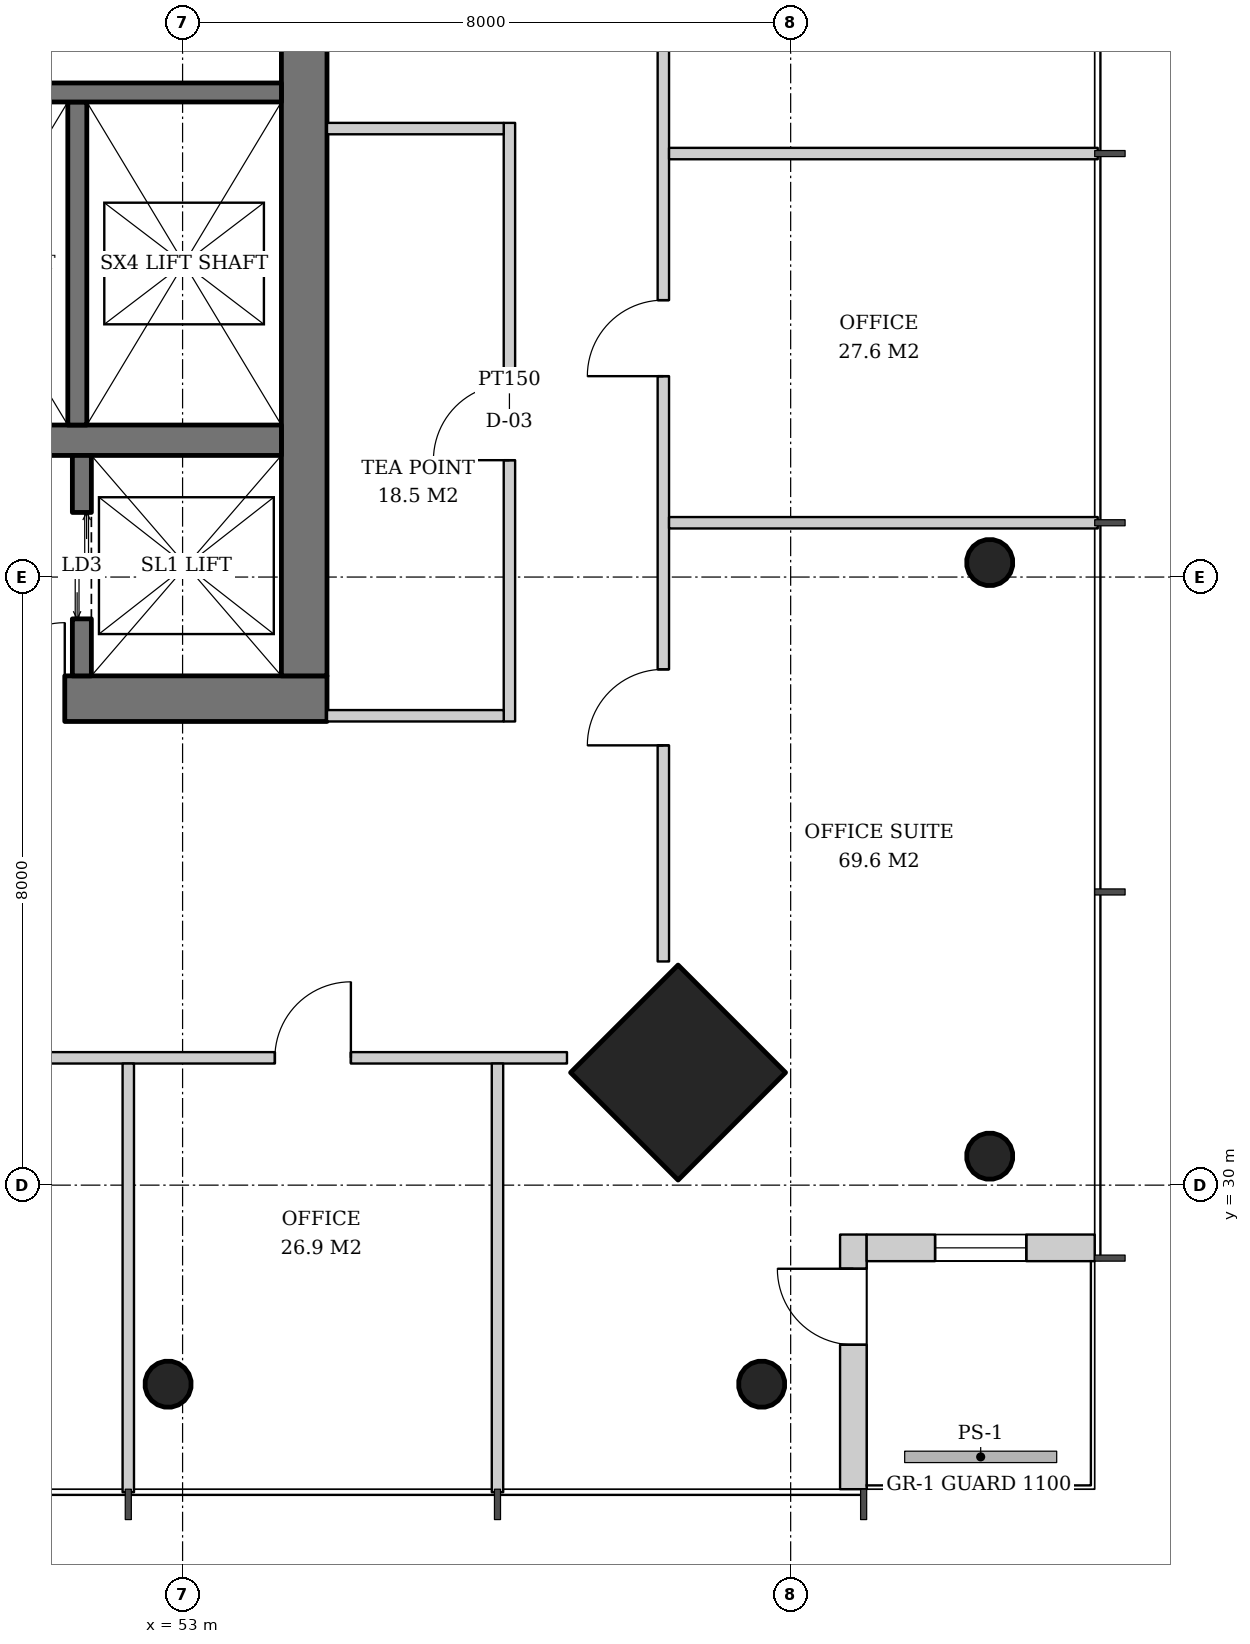
"""IFC4 building model, lengths in metres.
Left out: names, types, materials, properties, quantities, classifications, styles, units other than length and angle.
Written with IfcOpenShell. Run it as: python <this file> out.ifc"""

import sys

from ifc_helpers import new_model, si_unit, direction, frame, frame_2d, origin, origin_2d, place, context, subcontext, project, spatial, rectangle, hollow_circle, extrude, element, fill, save


model = new_model("IFC4")
c1 = context("Model", 3, precision=1e-05, world=origin(), true_north=direction((0.0, 1.0)))
c2 = subcontext(c1, "Body", "Model", "MODEL_VIEW")
j1 = project(units=[si_unit("LENGTHUNIT", "METRE"), si_unit("PLANEANGLEUNIT", "RADIAN")], contexts=[c1])
p1 = place(None, origin())
s1 = spatial("IfcSite", under=j1, at=p1, CompositionType="ELEMENT")
p2 = place(p1, origin())
s2 = spatial("IfcBuilding", under=s1, at=p2, CompositionType="ELEMENT")
p3 = place(p2, frame((0.0, 0.0, 188.2)))
s3 = spatial("IfcBuildingStorey", under=s2, at=p3, CompositionType="ELEMENT", Elevation=188.2)
p4 = place(p3, frame((63.657, 30.343, 0.0), z_axis=(-0.031962158256, 0.031962158256, 0.998977898093), x_axis=(-0.707106781187, -0.707106781187, 0.0)))
e1 = element("IfcColumn", 1, at=p4, inside=s3, PredefinedType="COLUMN", context=c2, shape_type="SweptSolid", body=[
    extrude(hollow_circle(Radius=0.305, WallThickness=0.025, at=origin_2d()), origin(), (0.0, 0.0, 1.0), 3.804),
])
p5 = place(p3, frame((63.657, 38.171, 0.0), z_axis=(-0.031974409754, 0.015987204877, 0.999360818924), x_axis=(-0.4472135955, -0.894427191, 0.0)))
e2 = element("IfcColumn", 2, at=p5, inside=s3, PredefinedType="COLUMN", context=c2, shape_type="SweptSolid", body=[
    extrude(hollow_circle(Radius=0.305, WallThickness=0.025, at=origin_2d()), origin(), (0.0, 0.0, 1.0), 3.802),
])
p6 = place(p3, frame((59.557, 31.443, 0.0), z_axis=(-0.031898107953, 0.031898107953, 0.998981992539), x_axis=(-0.707106781187, -0.707106781187, 0.0)))
e3 = element("IfcColumn", 3, at=p6, inside=s3, PredefinedType="COLUMN", context=c2, shape_type="SweptSolid", body=[
    extrude(rectangle(XDim=2.0, YDim=2.0, at=origin_2d()), origin(), (0.0, 0.0, 1.0), 3.804),
])
p7 = place(p3, frame((60.657, 27.343, 0.0), z_axis=(-0.031962158256, 0.031962158256, 0.998977898093), x_axis=(-0.707106781187, -0.707106781187, 0.0)))
e4 = element("IfcColumn", 4, at=p7, inside=s3, PredefinedType="COLUMN", context=c2, shape_type="SweptSolid", body=[
    extrude(hollow_circle(Radius=0.305, WallThickness=0.025, at=origin_2d()), origin(), (0.0, 0.0, 1.0), 3.804),
])
p8 = place(p3, frame((52.829, 27.343, 0.0), z_axis=(-0.015987204877, 0.031974409754, 0.999360818924), x_axis=(-0.894427191, -0.4472135955, 0.0)))
e5 = element("IfcColumn", 5, at=p8, inside=s3, PredefinedType="COLUMN", context=c2, shape_type="SweptSolid", body=[
    extrude(hollow_circle(Radius=0.305, WallThickness=0.025, at=origin_2d()), origin(), (0.0, 0.0, 1.0), 3.802),
])
p9 = place(p3, frame((35.1, 36.4, 0.0), z_axis=(0.0, 0.0, 1.0), x_axis=(1.0, 0.0, 0.0)))
e6 = element("IfcWall", 6, at=p9, inside=s3, PredefinedType="SHEAR", context=c2, shape_type="SweptSolid", body=[
    extrude(rectangle(XDim=19.8, YDim=0.6, at=frame_2d((9.9, 0.0))), origin(), (0.0, 0.0, 1.0), 3.8),
])
p10 = place(p9, frame((3.9, 0.0, 0.0)))
e7 = element("IfcOpeningElement", 7, at=p10, cuts=e6, PredefinedType="OPENING", context=c2, shape_type="SweptSolid", body=[
    extrude(rectangle(XDim=1.0, YDim=2.1, at=frame_2d((0.5, 1.05))), frame((0.0, 0.31, 0.0), z_axis=(0.0, -1.0, 0.0), x_axis=(1.0, 0.0, 0.0)), (0.0, 0.0, 1.0), 0.62),
])
p11 = place(p9, frame((15.35, 0.0, 0.0)))
e8 = element("IfcOpeningElement", 8, at=p11, cuts=e6, PredefinedType="OPENING", context=c2, shape_type="SweptSolid", body=[
    extrude(rectangle(XDim=1.0, YDim=2.1, at=frame_2d((0.5, 1.05))), frame((0.0, 0.31, 0.0), z_axis=(0.0, -1.0, 0.0), x_axis=(1.0, 0.0, 0.0)), (0.0, 0.0, 1.0), 0.62),
])
p12 = place(p3, frame((54.6, 36.7, 0.0), z_axis=(0.0, 0.0, 1.0), x_axis=(0.0, 1.0, 0.0)))
e9 = element("IfcWall", 9, at=p12, inside=s3, PredefinedType="SHEAR", context=c2, shape_type="SweptSolid", body=[
    extrude(rectangle(XDim=18.6, YDim=0.6, at=frame_2d((9.3, 0.0))), origin(), (0.0, 0.0, 1.0), 3.8),
])
p13 = place(p12, frame((8.4, 0.0, 0.0)))
e10 = element("IfcOpeningElement", 10, at=p13, cuts=e9, PredefinedType="OPENING", context=c2, shape_type="SweptSolid", body=[
    extrude(rectangle(XDim=1.8, YDim=2.4, at=frame_2d((0.9, 1.2))), frame((0.0, 0.31, 0.0), z_axis=(0.0, -1.0, 0.0), x_axis=(1.0, 0.0, 0.0)), (0.0, 0.0, 1.0), 0.62),
])
p14 = place(p3, frame((35.7, 39.8, 0.0), z_axis=(0.0, 0.0, 1.0), x_axis=(1.0, 0.0, 0.0)))
e11 = element("IfcWall", 11, at=p14, inside=s3, PredefinedType="SHEAR", context=c2, shape_type="SweptSolid", body=[
    extrude(rectangle(XDim=18.6, YDim=0.4, at=frame_2d((9.3, 0.0))), origin(), (0.0, 0.0, 1.0), 3.8),
])
p15 = place(p3, frame((61.825, 26.0, 0.0), z_axis=(0.0, 0.0, 1.0), x_axis=(0.0, 1.0, 0.0)))
e12 = element("IfcWall", 12, at=p15, inside=s3, PredefinedType="SOLIDWALL", context=c2, shape_type="SweptSolid", body=[
    extrude(rectangle(XDim=3.35, YDim=0.35, at=frame_2d((1.675, 0.0))), origin(), (0.0, 0.0, 1.0), 3.62),
])
p16 = place(p15, frame((1.9, 0.0, 0.0)))
e13 = element("IfcOpeningElement", 13, at=p16, cuts=e12, PredefinedType="OPENING", context=c2, shape_type="SweptSolid", body=[
    extrude(rectangle(XDim=1.0, YDim=2.4, at=frame_2d((0.5, 1.2))), frame((0.0, 0.185, 0.0), z_axis=(0.0, -1.0, 0.0), x_axis=(1.0, 0.0, 0.0)), (0.0, 0.0, 1.0), 0.37),
])
p17 = place(p3, frame((62.0, 29.175, 0.0), z_axis=(0.0, 0.0, 1.0), x_axis=(1.0, 0.0, 0.0)))
e14 = element("IfcWall", 14, at=p17, inside=s3, PredefinedType="SOLIDWALL", context=c2, shape_type="SweptSolid", body=[
    extrude(rectangle(XDim=3.0, YDim=0.35, at=frame_2d((1.5, 0.0))), origin(), (0.0, 0.0, 1.0), 3.62),
])
p18 = place(p17, frame((0.9, 0.0, 0.6)))
e15 = element("IfcOpeningElement", 15, at=p18, cuts=e14, PredefinedType="OPENING", context=c2, shape_type="SweptSolid", body=[
    extrude(rectangle(XDim=1.2, YDim=2.55, at=frame_2d((0.6, 1.275))), frame((0.0, 0.185, 0.0), z_axis=(0.0, -1.0, 0.0), x_axis=(1.0, 0.0, 0.0)), (0.0, 0.0, 1.0), 0.37),
])
p19 = place(p3, frame((51.675, 36.7, 0.0), z_axis=(0.0, 0.0, 1.0), x_axis=(0.0, 1.0, 0.0)))
e16 = element("IfcWall", 16, at=p19, inside=s3, PredefinedType="SHEAR", context=c2, shape_type="SweptSolid", body=[
    extrude(rectangle(XDim=2.9, YDim=0.25, at=frame_2d((1.45, 0.0))), origin(), (0.0, 0.0, 1.0), 3.8),
])
p20 = place(p19, frame((0.75, 0.0, 0.0)))
e17 = element("IfcOpeningElement", 17, at=p20, cuts=e16, PredefinedType="OPENING", context=c2, shape_type="SweptSolid", body=[
    extrude(rectangle(XDim=1.4, YDim=2.4, at=frame_2d((0.7, 1.2))), frame((0.0, 0.135, 0.0), z_axis=(0.0, -1.0, 0.0), x_axis=(1.0, 0.0, 0.0)), (0.0, 0.0, 1.0), 0.27),
])
p21 = place(p3, frame((51.615, 44.25, 0.0), z_axis=(0.0, 0.0, 1.0), x_axis=(0.0, -1.0, 0.0)))
e18 = element("IfcWall", 18, at=p21, inside=s3, PredefinedType="SHEAR", context=c2, shape_type="SweptSolid", body=[
    extrude(rectangle(XDim=4.25, YDim=0.25, at=frame_2d((2.125, 0.0))), origin(), (0.0, 0.0, 1.0), 3.8),
])
p22 = place(p3, frame((48.93, 44.375, 0.0), z_axis=(0.0, 0.0, 1.0), x_axis=(1.0, 0.0, 0.0)))
e19 = element("IfcWall", 19, at=p22, inside=s3, PredefinedType="SHEAR", context=c2, shape_type="SweptSolid", body=[
    extrude(rectangle(XDim=5.37, YDim=0.25, at=frame_2d((2.685, 0.0))), origin(), (0.0, 0.0, 1.0), 3.8),
])
p23 = place(p3, frame((57.3, 36.1, 0.0), z_axis=(0.0, 0.0, 1.0), x_axis=(0.0, 1.0, 0.0)))
e20 = element("IfcWall", 20, at=p23, inside=s3, PredefinedType="PARTITIONING", context=c2, shape_type="SweptSolid", body=[
    extrude(rectangle(XDim=7.875, YDim=0.15, at=frame_2d((3.938, 0.0))), origin(), (0.0, 0.0, 1.0), 2.867),
])
p24 = place(p23, frame((3.438, 0.0, 0.0)))
e21 = element("IfcOpeningElement", 21, at=p24, cuts=e20, PredefinedType="OPENING", context=c2, shape_type="SweptSolid", body=[
    extrude(rectangle(XDim=1.0, YDim=2.1, at=frame_2d((0.5, 1.05))), frame((0.0, 0.085, 0.0), z_axis=(0.0, -1.0, 0.0), x_axis=(1.0, 0.0, 0.0)), (0.0, 0.0, 1.0), 0.17),
])
p25 = place(p3, frame((54.9, 36.175, 0.0), z_axis=(0.0, 0.0, 1.0), x_axis=(1.0, 0.0, 0.0)))
e22 = element("IfcWall", 22, at=p25, inside=s3, PredefinedType="PARTITIONING", context=c2, shape_type="SweptSolid", body=[
    extrude(rectangle(XDim=2.325, YDim=0.15, at=frame_2d((1.163, 0.0))), origin(), (0.0, 0.0, 1.0), 2.867),
])
p26 = place(p3, frame((54.9, 43.9, 0.0), z_axis=(0.0, 0.0, 1.0), x_axis=(1.0, 0.0, 0.0)))
e23 = element("IfcWall", 23, at=p26, inside=s3, PredefinedType="PARTITIONING", context=c2, shape_type="SweptSolid", body=[
    extrude(rectangle(XDim=2.325, YDim=0.15, at=frame_2d((1.163, 0.0))), origin(), (0.0, 0.0, 1.0), 3.62),
])
p27 = place(p3, frame((59.325, 32.943, 0.0), z_axis=(0.0, 0.0, 1.0), x_axis=(0.0, 1.0, 0.0)))
e24 = element("IfcWall", 24, at=p27, inside=s3, PredefinedType="PARTITIONING", context=c2, shape_type="SweptSolid", body=[
    extrude(rectangle(XDim=26.114, YDim=0.15, at=frame_2d((13.057, 0.0))), origin(), (0.0, 0.0, 1.0), 2.867),
])
p28 = place(p27, frame((2.843, 0.0, 0.0)))
e25 = element("IfcOpeningElement", 25, at=p28, cuts=e24, PredefinedType="OPENING", context=c2, shape_type="SweptSolid", body=[
    extrude(rectangle(XDim=1.0, YDim=2.1, at=frame_2d((0.5, 1.05))), frame((0.0, 0.085, 0.0), z_axis=(0.0, -1.0, 0.0), x_axis=(1.0, 0.0, 0.0)), (0.0, 0.0, 1.0), 0.17),
])
p29 = place(p27, frame((7.7, 0.0, 0.0)))
e26 = element("IfcOpeningElement", 26, at=p29, cuts=e24, PredefinedType="OPENING", context=c2, shape_type="SweptSolid", body=[
    extrude(rectangle(XDim=1.0, YDim=2.1, at=frame_2d((0.5, 1.05))), frame((0.0, 0.085, 0.0), z_axis=(0.0, -1.0, 0.0), x_axis=(1.0, 0.0, 0.0)), (0.0, 0.0, 1.0), 0.17),
])
p30 = place(p27, frame((12.557, 0.0, 0.0)))
e27 = element("IfcOpeningElement", 27, at=p30, cuts=e24, PredefinedType="OPENING", context=c2, shape_type="SweptSolid", body=[
    extrude(rectangle(XDim=1.0, YDim=2.1, at=frame_2d((0.5, 1.05))), frame((0.0, 0.085, 0.0), z_axis=(0.0, -1.0, 0.0), x_axis=(1.0, 0.0, 0.0)), (0.0, 0.0, 1.0), 0.17),
])
p31 = place(p27, frame((17.414, 0.0, 0.0)))
e28 = element("IfcOpeningElement", 28, at=p31, cuts=e24, PredefinedType="OPENING", context=c2, shape_type="SweptSolid", body=[
    extrude(rectangle(XDim=1.0, YDim=2.1, at=frame_2d((0.5, 1.05))), frame((0.0, 0.085, 0.0), z_axis=(0.0, -1.0, 0.0), x_axis=(1.0, 0.0, 0.0)), (0.0, 0.0, 1.0), 0.17),
])
for number, where, z_axis, x_axis in (
    (29, (59.4, 38.714, 0.0), (0.0, 0.0, 1.0), (1.0, 0.0, 0.0)),
    (30, (59.4, 43.572, 0.0), (0.0, 0.0, 1.0), (1.0, 0.0, 0.0)),
):
    element("IfcWall", number, at=place(p3, frame(where, z_axis=z_axis, x_axis=x_axis)), inside=s3, PredefinedType="PARTITIONING", context=c2, shape_type="SweptSolid", body=[
        extrude(rectangle(XDim=5.64, YDim=0.15, at=frame_2d((2.82, 0.0))), origin(), (0.0, 0.0, 1.0), 3.12),
    ])
p32 = place(p3, frame((31.943, 31.675, 0.0), z_axis=(0.0, 0.0, 1.0), x_axis=(1.0, 0.0, 0.0)))
e31 = element("IfcWall", 31, at=p32, inside=s3, PredefinedType="PARTITIONING", context=c2, shape_type="SweptSolid", body=[
    extrude(rectangle(XDim=26.114, YDim=0.15, at=frame_2d((13.057, 0.0))), origin(), (0.0, 0.0, 1.0), 2.867),
])
p33 = place(p32, frame((2.843, 0.0, 0.0)))
e32 = element("IfcOpeningElement", 32, at=p33, cuts=e31, PredefinedType="OPENING", context=c2, shape_type="SweptSolid", body=[
    extrude(rectangle(XDim=1.0, YDim=2.1, at=frame_2d((0.5, 1.05))), frame((0.0, 0.085, 0.0), z_axis=(0.0, -1.0, 0.0), x_axis=(1.0, 0.0, 0.0)), (0.0, 0.0, 1.0), 0.17),
])
p34 = place(p32, frame((7.7, 0.0, 0.0)))
e33 = element("IfcOpeningElement", 33, at=p34, cuts=e31, PredefinedType="OPENING", context=c2, shape_type="SweptSolid", body=[
    extrude(rectangle(XDim=1.0, YDim=2.1, at=frame_2d((0.5, 1.05))), frame((0.0, 0.085, 0.0), z_axis=(0.0, -1.0, 0.0), x_axis=(1.0, 0.0, 0.0)), (0.0, 0.0, 1.0), 0.17),
])
p35 = place(p32, frame((12.557, 0.0, 0.0)))
e34 = element("IfcOpeningElement", 34, at=p35, cuts=e31, PredefinedType="OPENING", context=c2, shape_type="SweptSolid", body=[
    extrude(rectangle(XDim=1.0, YDim=2.1, at=frame_2d((0.5, 1.05))), frame((0.0, 0.085, 0.0), z_axis=(0.0, -1.0, 0.0), x_axis=(1.0, 0.0, 0.0)), (0.0, 0.0, 1.0), 0.17),
])
p36 = place(p32, frame((17.414, 0.0, 0.0)))
e35 = element("IfcOpeningElement", 35, at=p36, cuts=e31, PredefinedType="OPENING", context=c2, shape_type="SweptSolid", body=[
    extrude(rectangle(XDim=1.0, YDim=2.1, at=frame_2d((0.5, 1.05))), frame((0.0, 0.085, 0.0), z_axis=(0.0, -1.0, 0.0), x_axis=(1.0, 0.0, 0.0)), (0.0, 0.0, 1.0), 0.17),
])
p37 = place(p32, frame((22.271, 0.0, 0.0)))
e36 = element("IfcOpeningElement", 36, at=p37, cuts=e31, PredefinedType="OPENING", context=c2, shape_type="SweptSolid", body=[
    extrude(rectangle(XDim=1.0, YDim=2.1, at=frame_2d((0.5, 1.05))), frame((0.0, 0.085, 0.0), z_axis=(0.0, -1.0, 0.0), x_axis=(1.0, 0.0, 0.0)), (0.0, 0.0, 1.0), 0.17),
])
for number, where, z_axis, x_axis in (
    (37, (52.286, 31.6, 0.0), (0.0, 0.0, 1.0), (0.0, -1.0, 0.0)),
    (38, (57.143, 31.6, 0.0), (0.0, 0.0, 1.0), (0.0, -1.0, 0.0)),
):
    element("IfcWall", number, at=place(p3, frame(where, z_axis=z_axis, x_axis=x_axis)), inside=s3, PredefinedType="PARTITIONING", context=c2, shape_type="SweptSolid", body=[
        extrude(rectangle(XDim=5.64, YDim=0.15, at=frame_2d((2.82, 0.0))), origin(), (0.0, 0.0, 1.0), 3.12),
    ])
p38 = place(p16, origin())
e39 = element("IfcDoor", 39, at=p38, inside=s3, OperationType="SINGLE_SWING_RIGHT", PredefinedType="DOOR", context=c2, shape_type="SweptSolid", body=[
    extrude(rectangle(XDim=1.0, YDim=2.4, at=frame_2d((0.5, 1.2))), frame((0.0, 0.025, 0.0), z_axis=(0.0, -1.0, 0.0), x_axis=(1.0, 0.0, 0.0)), (0.0, 0.0, 1.0), 0.05),
])
fill(e13, e39)
p39 = place(p18, origin())
e40 = element("IfcWindow", 40, at=p39, inside=s3, PartitioningType="SINGLE_PANEL", PredefinedType="WINDOW", context=c2, shape_type="SweptSolid", body=[
    extrude(rectangle(XDim=1.2, YDim=2.55, at=frame_2d((0.6, 1.275))), frame((0.0, 0.03, 0.0), z_axis=(0.0, -1.0, 0.0), x_axis=(1.0, 0.0, 0.0)), (0.0, 0.0, 1.0), 0.06),
])
fill(e15, e40)
p40 = place(p20, origin())
e41 = element("IfcDoor", 41, at=p40, inside=s3, OperationType="DOUBLE_DOOR_SLIDING", PredefinedType="DOOR", context=c2, shape_type="SweptSolid", body=[
    extrude(rectangle(XDim=1.4, YDim=2.4, at=frame_2d((0.7, 1.2))), frame((0.0, 0.025, 0.0), z_axis=(0.0, -1.0, 0.0), x_axis=(1.0, 0.0, 0.0)), (0.0, 0.0, 1.0), 0.05),
])
fill(e17, e41)
p41 = place(p11, origin())
e42 = element("IfcDoor", 42, at=p41, inside=s3, OperationType="SINGLE_SWING_RIGHT", PredefinedType="DOOR", context=c2, shape_type="SweptSolid", body=[
    extrude(rectangle(XDim=1.0, YDim=2.1, at=frame_2d((0.5, 1.05))), frame((0.0, 0.025, 0.0), z_axis=(0.0, -1.0, 0.0), x_axis=(1.0, 0.0, 0.0)), (0.0, 0.0, 1.0), 0.05),
])
fill(e8, e42)
p42 = place(p24, origin())
e43 = element("IfcDoor", 43, at=p42, inside=s3, OperationType="SINGLE_SWING_LEFT", PredefinedType="DOOR", context=c2, shape_type="SweptSolid", body=[
    extrude(rectangle(XDim=1.0, YDim=2.1, at=frame_2d((0.5, 1.05))), frame((0.0, 0.025, 0.0), z_axis=(0.0, -1.0, 0.0), x_axis=(1.0, 0.0, 0.0)), (0.0, 0.0, 1.0), 0.05),
])
fill(e21, e43)
p43 = place(p28, origin())
e44 = element("IfcDoor", 44, at=p43, inside=s3, OperationType="SINGLE_SWING_LEFT", PredefinedType="DOOR", context=c2, shape_type="SweptSolid", body=[
    extrude(rectangle(XDim=1.0, YDim=2.1, at=frame_2d((0.5, 1.05))), frame((0.0, 0.025, 0.0), z_axis=(0.0, -1.0, 0.0), x_axis=(1.0, 0.0, 0.0)), (0.0, 0.0, 1.0), 0.05),
])
fill(e25, e44)
p44 = place(p29, origin())
e45 = element("IfcDoor", 45, at=p44, inside=s3, OperationType="SINGLE_SWING_LEFT", PredefinedType="DOOR", context=c2, shape_type="SweptSolid", body=[
    extrude(rectangle(XDim=1.0, YDim=2.1, at=frame_2d((0.5, 1.05))), frame((0.0, 0.025, 0.0), z_axis=(0.0, -1.0, 0.0), x_axis=(1.0, 0.0, 0.0)), (0.0, 0.0, 1.0), 0.05),
])
fill(e26, e45)
p45 = place(p37, origin())
e46 = element("IfcDoor", 46, at=p45, inside=s3, OperationType="SINGLE_SWING_RIGHT", PredefinedType="DOOR", context=c2, shape_type="SweptSolid", body=[
    extrude(rectangle(XDim=1.0, YDim=2.1, at=frame_2d((0.5, 1.05))), frame((0.0, 0.025, 0.0), z_axis=(0.0, -1.0, 0.0), x_axis=(1.0, 0.0, 0.0)), (0.0, 0.0, 1.0), 0.05),
])
fill(e36, e46)
save(model, sys.argv[1])
